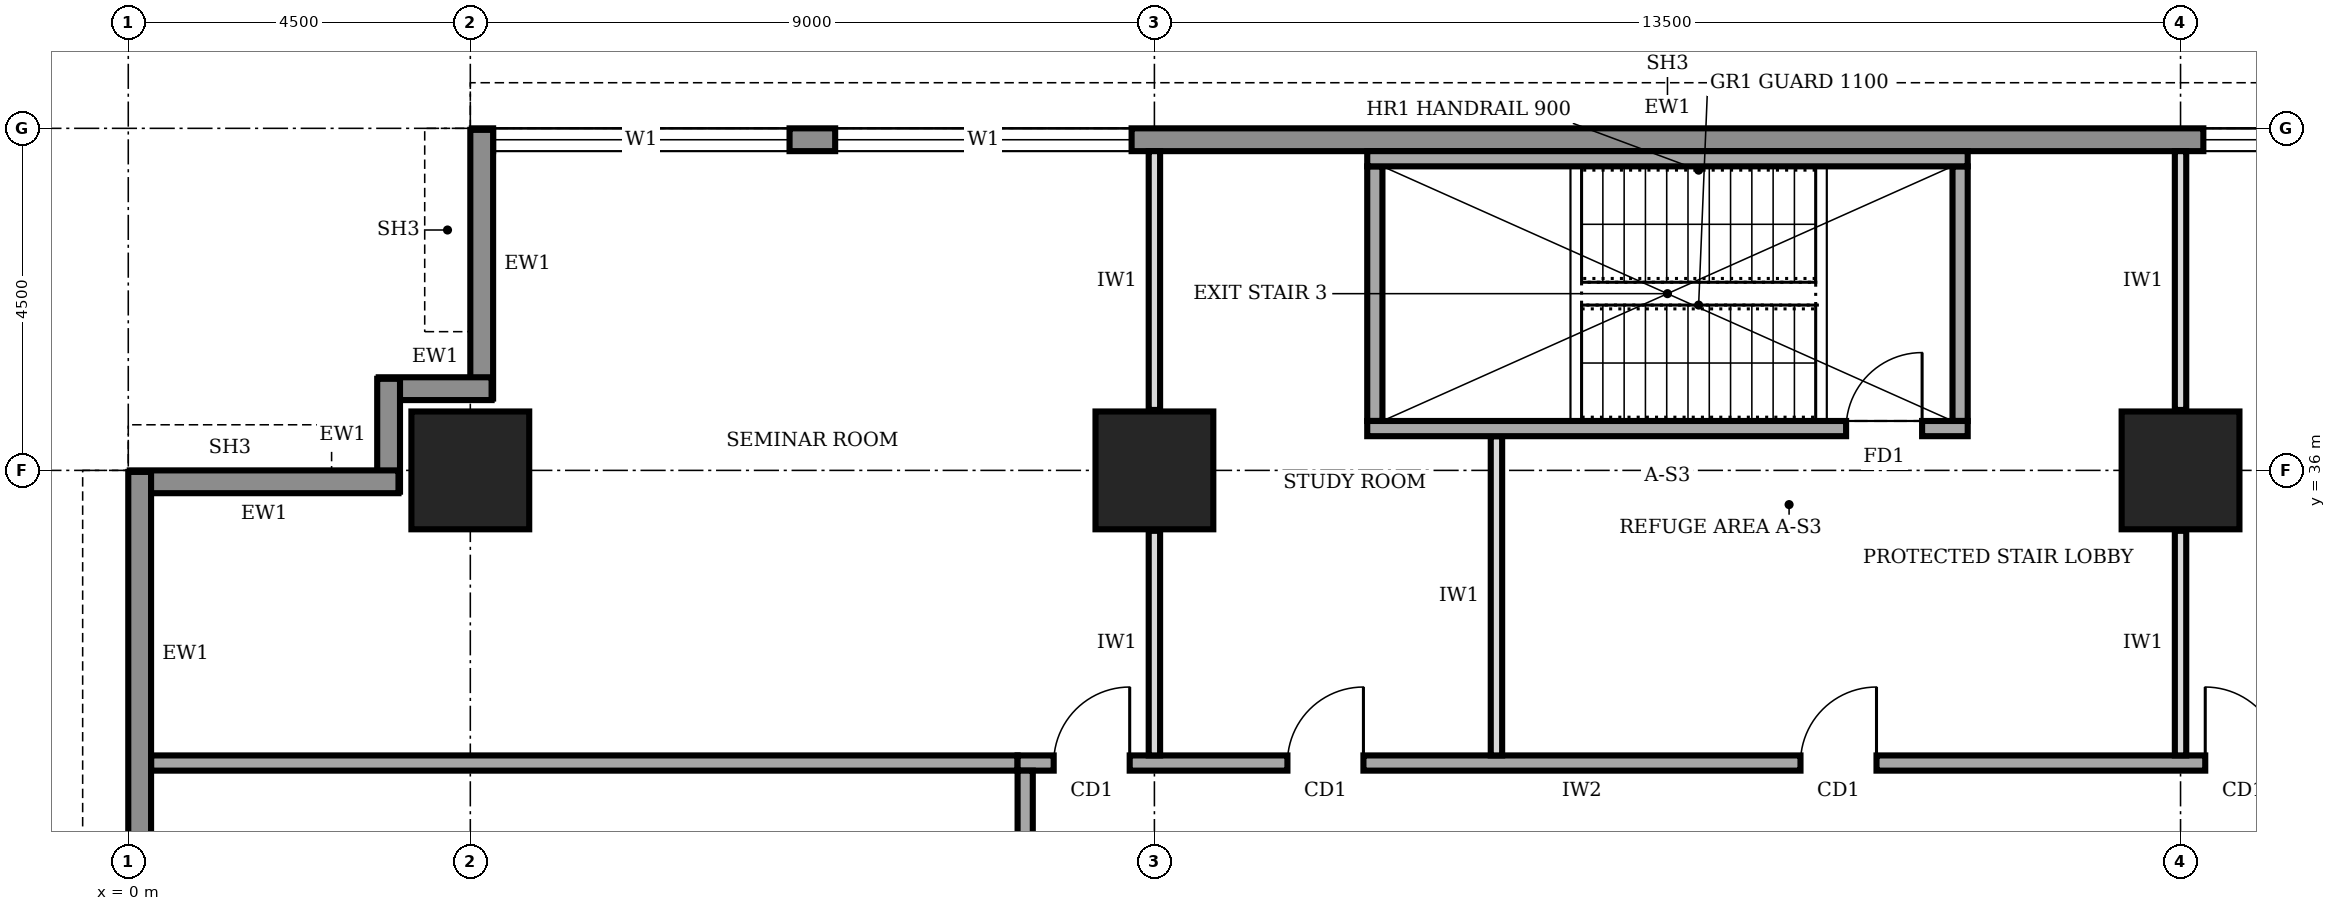
"""IFC4 building model, lengths in metres.
Left out: names, types, materials, properties, quantities, classifications, styles, units other than length and angle.
Written with IfcOpenShell. Run it as: python <this file> out.ifc"""

import sys

from ifc_helpers import new_model, si_unit, direction, frame, frame_2d, origin, origin_2d, place, context, subcontext, project, spatial, rectangle, extrude, element, fill, save


model = new_model("IFC4")
c1 = context("Model", 3, precision=1e-05, world=origin(), true_north=direction((0.0, 1.0)))
c2 = subcontext(c1, "Body", "Model", "MODEL_VIEW")
j1 = project(units=[si_unit("LENGTHUNIT", "METRE"), si_unit("PLANEANGLEUNIT", "RADIAN")], contexts=[c1])
p1 = place(None, origin())
s1 = spatial("IfcSite", under=j1, at=p1, CompositionType="ELEMENT")
p2 = place(p1, origin())
s2 = spatial("IfcBuilding", under=s1, at=p2, CompositionType="ELEMENT")
p3 = place(p2, frame((0.0, 0.0, 221.0)))
s3 = spatial("IfcBuildingStorey", under=s2, at=p3, CompositionType="ELEMENT", Elevation=221.0)
for number, where, z_axis, x_axis in (
    (1, (4.5, 36.0, 0.0), (0.0, 0.0, 1.0), (1.0, 0.0, 0.0)),
    (2, (13.5, 36.0, 0.0), (0.0, 0.0, 1.0), (1.0, 0.0, 0.0)),
    (3, (27.0, 36.0, 0.0), (0.0, 0.0, 1.0), (1.0, 0.0, 0.0)),
):
    element("IfcColumn", number, at=place(p3, frame(where, z_axis=z_axis, x_axis=x_axis)), inside=s3, PredefinedType="COLUMN", context=c2, shape_type="SweptSolid", body=[
        extrude(rectangle(XDim=1.55, YDim=1.55, at=origin_2d()), origin(), (0.0, 0.0, 1.0), 4.0),
    ])
p4 = place(p3, frame((35.98, 40.35, 0.0), z_axis=(0.0, 0.0, 1.0), x_axis=(-1.0, 0.0, 0.0)))
e4 = element("IfcWall", 4, at=p4, inside=s3, PredefinedType="STANDARD", context=c2, shape_type="SweptSolid", body=[
    extrude(rectangle(XDim=31.46, YDim=0.3, at=frame_2d((15.73, 0.0))), origin(), (0.0, 0.0, 1.0), 3.75),
])
p5 = place(p4, frame((27.28, 0.0, 0.9)))
e5 = element("IfcOpeningElement", 5, at=p5, cuts=e4, PredefinedType="OPENING", context=c2, shape_type="SweptSolid", body=[
    extrude(rectangle(XDim=3.9, YDim=2.2, at=frame_2d((1.95, 1.1))), frame((0.0, 0.16, 0.0), z_axis=(0.0, -1.0, 0.0), x_axis=(1.0, 0.0, 0.0)), (0.0, 0.0, 1.0), 0.32),
])
p6 = place(p4, frame((22.78, 0.0, 0.9)))
e6 = element("IfcOpeningElement", 6, at=p6, cuts=e4, PredefinedType="OPENING", context=c2, shape_type="SweptSolid", body=[
    extrude(rectangle(XDim=3.9, YDim=2.2, at=frame_2d((1.95, 1.1))), frame((0.0, 0.16, 0.0), z_axis=(0.0, -1.0, 0.0), x_axis=(1.0, 0.0, 0.0)), (0.0, 0.0, 1.0), 0.32),
])
p7 = place(p4, frame((4.78, 0.0, 0.9)))
e7 = element("IfcOpeningElement", 7, at=p7, cuts=e4, PredefinedType="OPENING", context=c2, shape_type="SweptSolid", body=[
    extrude(rectangle(XDim=3.9, YDim=2.2, at=frame_2d((1.95, 1.1))), frame((0.0, 0.16, 0.0), z_axis=(0.0, -1.0, 0.0), x_axis=(1.0, 0.0, 0.0)), (0.0, 0.0, 1.0), 0.32),
])
p8 = place(p3, frame((4.65, 40.48, 0.0), z_axis=(0.0, 0.0, 1.0), x_axis=(0.0, -1.0, 0.0)))
e8 = element("IfcWall", 8, at=p8, inside=s3, PredefinedType="STANDARD", context=c2, shape_type="SweptSolid", body=[
    extrude(rectangle(XDim=3.535, YDim=0.3, at=frame_2d((1.768, 0.0))), origin(), (0.0, 0.0, 1.0), 2.85),
])
for number, where, z_axis, x_axis in (
    (9, (4.78, 37.075, 0.0), (0.0, 0.0, 1.0), (-1.0, 0.0, 0.0)),
    (10, (3.425, 37.205, 0.0), (0.0, 0.0, 1.0), (0.0, -1.0, 0.0)),
):
    element("IfcWall", number, at=place(p3, frame(where, z_axis=z_axis, x_axis=x_axis)), inside=s3, PredefinedType="STANDARD", context=c2, shape_type="SweptSolid", body=[
        extrude(rectangle(XDim=1.485, YDim=0.3, at=frame_2d((0.743, 0.0))), origin(), (0.0, 0.0, 1.0), 3.75),
    ])
p9 = place(p3, frame((3.555, 35.85, 0.0), z_axis=(0.0, 0.0, 1.0), x_axis=(-1.0, 0.0, 0.0)))
e11 = element("IfcWall", 11, at=p9, inside=s3, PredefinedType="STANDARD", context=c2, shape_type="SweptSolid", body=[
    extrude(rectangle(XDim=3.535, YDim=0.3, at=frame_2d((1.768, 0.0))), origin(), (0.0, 0.0, 1.0), 2.85),
])
p10 = place(p3, frame((0.15, 35.98, 0.0), z_axis=(0.0, 0.0, 1.0), x_axis=(0.0, -1.0, 0.0)))
e12 = element("IfcWall", 12, at=p10, inside=s3, PredefinedType="STANDARD", context=c2, shape_type="SweptSolid", body=[
    extrude(rectangle(XDim=31.46, YDim=0.3, at=frame_2d((15.73, 0.0))), origin(), (0.0, 0.0, 1.0), 3.75),
])
p11 = place(p10, frame((27.28, 0.0, 0.9)))
e13 = element("IfcOpeningElement", 13, at=p11, cuts=e12, PredefinedType="OPENING", context=c2, shape_type="SweptSolid", body=[
    extrude(rectangle(XDim=3.9, YDim=2.2, at=frame_2d((1.95, 1.1))), frame((0.0, 0.16, 0.0), z_axis=(0.0, -1.0, 0.0), x_axis=(1.0, 0.0, 0.0)), (0.0, 0.0, 1.0), 0.32),
])
p12 = place(p10, frame((22.78, 0.0, 0.9)))
e14 = element("IfcOpeningElement", 14, at=p12, cuts=e12, PredefinedType="OPENING", context=c2, shape_type="SweptSolid", body=[
    extrude(rectangle(XDim=3.9, YDim=2.2, at=frame_2d((1.95, 1.1))), frame((0.0, 0.16, 0.0), z_axis=(0.0, -1.0, 0.0), x_axis=(1.0, 0.0, 0.0)), (0.0, 0.0, 1.0), 0.32),
])
p13 = place(p10, frame((18.28, 0.0, 0.9)))
e15 = element("IfcOpeningElement", 15, at=p13, cuts=e12, PredefinedType="OPENING", context=c2, shape_type="SweptSolid", body=[
    extrude(rectangle(XDim=3.9, YDim=2.2, at=frame_2d((1.95, 1.1))), frame((0.0, 0.16, 0.0), z_axis=(0.0, -1.0, 0.0), x_axis=(1.0, 0.0, 0.0)), (0.0, 0.0, 1.0), 0.32),
])
p14 = place(p10, frame((13.78, 0.0, 0.9)))
e16 = element("IfcOpeningElement", 16, at=p14, cuts=e12, PredefinedType="OPENING", context=c2, shape_type="SweptSolid", body=[
    extrude(rectangle(XDim=3.9, YDim=2.2, at=frame_2d((1.95, 1.1))), frame((0.0, 0.16, 0.0), z_axis=(0.0, -1.0, 0.0), x_axis=(1.0, 0.0, 0.0)), (0.0, 0.0, 1.0), 0.32),
])
p15 = place(p10, frame((9.28, 0.0, 0.9)))
e17 = element("IfcOpeningElement", 17, at=p15, cuts=e12, PredefinedType="OPENING", context=c2, shape_type="SweptSolid", body=[
    extrude(rectangle(XDim=3.9, YDim=2.2, at=frame_2d((1.95, 1.1))), frame((0.0, 0.16, 0.0), z_axis=(0.0, -1.0, 0.0), x_axis=(1.0, 0.0, 0.0)), (0.0, 0.0, 1.0), 0.32),
])
p16 = place(p10, frame((4.78, 0.0, 0.9)))
e18 = element("IfcOpeningElement", 18, at=p16, cuts=e12, PredefinedType="OPENING", context=c2, shape_type="SweptSolid", body=[
    extrude(rectangle(XDim=3.9, YDim=2.2, at=frame_2d((1.95, 1.1))), frame((0.0, 0.16, 0.0), z_axis=(0.0, -1.0, 0.0), x_axis=(1.0, 0.0, 0.0)), (0.0, 0.0, 1.0), 0.32),
])
p17 = place(p3, frame((28.6, 32.15, 0.0), z_axis=(0.0, 0.0, 1.0), x_axis=(-1.0, 0.0, 0.0)))
e19 = element("IfcWall", 19, at=p17, inside=s3, PredefinedType="SOLIDWALL", context=c2, shape_type="SweptSolid", body=[
    extrude(rectangle(XDim=16.9, YDim=0.2, at=frame_2d((8.45, 0.0))), origin(), (0.0, 0.0, 1.0), 3.75),
])
p18 = place(p17, frame((15.425, 0.0, 0.0)))
e20 = element("IfcOpeningElement", 20, at=p18, cuts=e19, PredefinedType="OPENING", context=c2, shape_type="SweptSolid", body=[
    extrude(rectangle(XDim=1.0, YDim=2.1, at=frame_2d((0.5, 1.05))), frame((0.0, 0.11, 0.0), z_axis=(0.0, -1.0, 0.0), x_axis=(1.0, 0.0, 0.0)), (0.0, 0.0, 1.0), 0.22),
])
p19 = place(p17, frame((12.35, 0.0, 0.0)))
e21 = element("IfcOpeningElement", 21, at=p19, cuts=e19, PredefinedType="OPENING", context=c2, shape_type="SweptSolid", body=[
    extrude(rectangle(XDim=1.0, YDim=2.1, at=frame_2d((0.5, 1.05))), frame((0.0, 0.11, 0.0), z_axis=(0.0, -1.0, 0.0), x_axis=(1.0, 0.0, 0.0)), (0.0, 0.0, 1.0), 0.22),
])
p20 = place(p17, frame((5.6, 0.0, 0.0)))
e22 = element("IfcOpeningElement", 22, at=p20, cuts=e19, PredefinedType="OPENING", context=c2, shape_type="SweptSolid", body=[
    extrude(rectangle(XDim=1.0, YDim=2.1, at=frame_2d((0.5, 1.05))), frame((0.0, 0.11, 0.0), z_axis=(0.0, -1.0, 0.0), x_axis=(1.0, 0.0, 0.0)), (0.0, 0.0, 1.0), 0.22),
])
p21 = place(p17, frame((0.275, 0.0, 0.0)))
e23 = element("IfcOpeningElement", 23, at=p21, cuts=e19, PredefinedType="OPENING", context=c2, shape_type="SweptSolid", body=[
    extrude(rectangle(XDim=1.0, YDim=2.1, at=frame_2d((0.5, 1.05))), frame((0.0, 0.11, 0.0), z_axis=(0.0, -1.0, 0.0), x_axis=(1.0, 0.0, 0.0)), (0.0, 0.0, 1.0), 0.22),
])
p22 = place(p3, frame((11.8, 32.05, 0.0), z_axis=(0.0, 0.0, 1.0), x_axis=(0.0, -1.0, 0.0)))
e24 = element("IfcWall", 24, at=p22, inside=s3, PredefinedType="SOLIDWALL", context=c2, shape_type="SweptSolid", body=[
    extrude(rectangle(XDim=23.8, YDim=0.2, at=frame_2d((11.9, 0.0))), origin(), (0.0, 0.0, 1.0), 3.75),
])
p23 = place(p22, frame((20.675, 0.0, 0.0)))
e25 = element("IfcOpeningElement", 25, at=p23, cuts=e24, PredefinedType="OPENING", context=c2, shape_type="SweptSolid", body=[
    extrude(rectangle(XDim=1.0, YDim=2.1, at=frame_2d((0.5, 1.05))), frame((0.0, 0.11, 0.0), z_axis=(0.0, -1.0, 0.0), x_axis=(1.0, 0.0, 0.0)), (0.0, 0.0, 1.0), 0.22),
])
p24 = place(p22, frame((16.4, 0.0, 0.0)))
e26 = element("IfcOpeningElement", 26, at=p24, cuts=e24, PredefinedType="OPENING", context=c2, shape_type="SweptSolid", body=[
    extrude(rectangle(XDim=0.9, YDim=2.1, at=frame_2d((0.45, 1.05))), frame((0.0, 0.11, 0.0), z_axis=(0.0, -1.0, 0.0), x_axis=(1.0, 0.0, 0.0)), (0.0, 0.0, 1.0), 0.22),
])
p25 = place(p22, frame((11.6, 0.0, 0.0)))
e27 = element("IfcOpeningElement", 27, at=p25, cuts=e24, PredefinedType="OPENING", context=c2, shape_type="SweptSolid", body=[
    extrude(rectangle(XDim=0.9, YDim=2.1, at=frame_2d((0.45, 1.05))), frame((0.0, 0.11, 0.0), z_axis=(0.0, -1.0, 0.0), x_axis=(1.0, 0.0, 0.0)), (0.0, 0.0, 1.0), 0.22),
])
p26 = place(p22, frame((8.55, 0.0, 0.0)))
e28 = element("IfcOpeningElement", 28, at=p26, cuts=e24, PredefinedType="OPENING", context=c2, shape_type="SweptSolid", body=[
    extrude(rectangle(XDim=0.9, YDim=2.1, at=frame_2d((0.45, 1.05))), frame((0.0, 0.11, 0.0), z_axis=(0.0, -1.0, 0.0), x_axis=(1.0, 0.0, 0.0)), (0.0, 0.0, 1.0), 0.22),
])
p27 = place(p22, frame((5.55, 0.0, 0.0)))
e29 = element("IfcOpeningElement", 29, at=p27, cuts=e24, PredefinedType="OPENING", context=c2, shape_type="SweptSolid", body=[
    extrude(rectangle(XDim=1.0, YDim=2.1, at=frame_2d((0.5, 1.05))), frame((0.0, 0.11, 0.0), z_axis=(0.0, -1.0, 0.0), x_axis=(1.0, 0.0, 0.0)), (0.0, 0.0, 1.0), 0.22),
])
p28 = place(p22, frame((13.65, 0.0, 0.0)))
e30 = element("IfcOpeningElement", 30, at=p28, cuts=e24, PredefinedType="OPENING", context=c2, shape_type="SweptSolid", body=[
    extrude(rectangle(XDim=1.0, YDim=2.1, at=frame_2d((0.5, 1.05))), frame((0.0, 0.11, 0.0), z_axis=(0.0, -1.0, 0.0), x_axis=(1.0, 0.0, 0.0)), (0.0, 0.0, 1.0), 0.22),
])
p29 = place(p22, frame((1.925, 0.0, 0.0)))
e31 = element("IfcOpeningElement", 31, at=p29, cuts=e24, PredefinedType="OPENING", context=c2, shape_type="SweptSolid", body=[
    extrude(rectangle(XDim=1.0, YDim=2.1, at=frame_2d((0.5, 1.05))), frame((0.0, 0.11, 0.0), z_axis=(0.0, -1.0, 0.0), x_axis=(1.0, 0.0, 0.0)), (0.0, 0.0, 1.0), 0.22),
])
p30 = place(p3, frame((0.3, 32.15, 0.0), z_axis=(0.0, 0.0, 1.0), x_axis=(1.0, 0.0, 0.0)))
e32 = element("IfcWall", 32, at=p30, inside=s3, PredefinedType="SOLIDWALL", context=c2, shape_type="SweptSolid", body=[
    extrude(rectangle(XDim=11.4, YDim=0.2, at=frame_2d((5.7, 0.0))), origin(), (0.0, 0.0, 1.0), 3.75),
])
p31 = place(p3, frame((13.5, 32.25, 0.0), z_axis=(0.0, 0.0, 1.0), x_axis=(0.0, 1.0, 0.0)))
e33 = element("IfcWall", 33, at=p31, inside=s3, PredefinedType="PARTITIONING", context=c2, shape_type="SweptSolid", body=[
    extrude(rectangle(XDim=2.955, YDim=0.15, at=frame_2d((1.478, 0.0))), origin(), (0.0, 0.0, 1.0), 2.85),
])
p32 = place(p3, frame((13.5, 36.795, 0.0), z_axis=(0.0, 0.0, 1.0), x_axis=(0.0, 1.0, 0.0)))
e34 = element("IfcWall", 34, at=p32, inside=s3, PredefinedType="PARTITIONING", context=c2, shape_type="SweptSolid", body=[
    extrude(rectangle(XDim=3.405, YDim=0.15, at=frame_2d((1.703, 0.0))), origin(), (0.0, 0.0, 1.0), 2.85),
])
p33 = place(p3, frame((18.0, 32.25, 0.0), z_axis=(0.0, 0.0, 1.0), x_axis=(0.0, 1.0, 0.0)))
e35 = element("IfcWall", 35, at=p33, inside=s3, PredefinedType="PARTITIONING", context=c2, shape_type="SweptSolid", body=[
    extrude(rectangle(XDim=4.2, YDim=0.15, at=frame_2d((2.1, 0.0))), origin(), (0.0, 0.0, 1.0), 3.75),
])
p34 = place(p3, frame((27.0, 32.25, 0.0), z_axis=(0.0, 0.0, 1.0), x_axis=(0.0, 1.0, 0.0)))
e36 = element("IfcWall", 36, at=p34, inside=s3, PredefinedType="PARTITIONING", context=c2, shape_type="SweptSolid", body=[
    extrude(rectangle(XDim=2.955, YDim=0.15, at=frame_2d((1.478, 0.0))), origin(), (0.0, 0.0, 1.0), 2.85),
])
p35 = place(p3, frame((27.0, 36.795, 0.0), z_axis=(0.0, 0.0, 1.0), x_axis=(0.0, 1.0, 0.0)))
e37 = element("IfcWall", 37, at=p35, inside=s3, PredefinedType="PARTITIONING", context=c2, shape_type="SweptSolid", body=[
    extrude(rectangle(XDim=3.405, YDim=0.15, at=frame_2d((1.703, 0.0))), origin(), (0.0, 0.0, 1.0), 2.85),
])
p36 = place(p3, frame((16.3, 36.55, 0.0), z_axis=(0.0, 0.0, 1.0), x_axis=(1.0, 0.0, 0.0)))
e38 = element("IfcWall", 38, at=p36, inside=s3, PredefinedType="SOLIDWALL", context=c2, shape_type="SweptSolid", body=[
    extrude(rectangle(XDim=7.9, YDim=0.2, at=frame_2d((3.95, 0.0))), origin(), (0.0, 0.0, 1.0), 3.75),
])
p37 = place(p36, frame((6.3, 0.0, 0.0)))
e39 = element("IfcOpeningElement", 39, at=p37, cuts=e38, PredefinedType="OPENING", context=c2, shape_type="SweptSolid", body=[
    extrude(rectangle(XDim=1.0, YDim=2.1, at=frame_2d((0.5, 1.05))), frame((0.0, 0.11, 0.0), z_axis=(0.0, -1.0, 0.0), x_axis=(1.0, 0.0, 0.0)), (0.0, 0.0, 1.0), 0.22),
])
p38 = place(p3, frame((16.3, 40.1, 0.0), z_axis=(0.0, 0.0, 1.0), x_axis=(1.0, 0.0, 0.0)))
e40 = element("IfcWall", 40, at=p38, inside=s3, PredefinedType="SOLIDWALL", context=c2, shape_type="SweptSolid", body=[
    extrude(rectangle(XDim=7.9, YDim=0.2, at=frame_2d((3.95, 0.0))), origin(), (0.0, 0.0, 1.0), 3.75),
])
for number, where, z_axis, x_axis in (
    (41, (16.4, 36.65, 0.0), (0.0, 0.0, 1.0), (0.0, 1.0, 0.0)),
    (42, (24.1, 36.65, 0.0), (0.0, 0.0, 1.0), (0.0, 1.0, 0.0)),
):
    element("IfcWall", number, at=place(p3, frame(where, z_axis=z_axis, x_axis=x_axis)), inside=s3, PredefinedType="SOLIDWALL", context=c2, shape_type="SweptSolid", body=[
        extrude(rectangle(XDim=3.35, YDim=0.2, at=frame_2d((1.675, 0.0))), origin(), (0.0, 0.0, 1.0), 3.75),
    ])
p39 = place(p5, origin())
e43 = element("IfcWindow", 43, at=p39, inside=s3, PartitioningType="SINGLE_PANEL", PredefinedType="WINDOW", context=c2, shape_type="SweptSolid", body=[
    extrude(rectangle(XDim=3.9, YDim=2.2, at=frame_2d((1.95, 1.1))), frame((0.0, 0.03, 0.0), z_axis=(0.0, -1.0, 0.0), x_axis=(1.0, 0.0, 0.0)), (0.0, 0.0, 1.0), 0.06),
])
fill(e5, e43)
p40 = place(p6, origin())
e44 = element("IfcWindow", 44, at=p40, inside=s3, PartitioningType="SINGLE_PANEL", PredefinedType="WINDOW", context=c2, shape_type="SweptSolid", body=[
    extrude(rectangle(XDim=3.9, YDim=2.2, at=frame_2d((1.95, 1.1))), frame((0.0, 0.03, 0.0), z_axis=(0.0, -1.0, 0.0), x_axis=(1.0, 0.0, 0.0)), (0.0, 0.0, 1.0), 0.06),
])
fill(e6, e44)
p41 = place(p7, origin())
e45 = element("IfcWindow", 45, at=p41, inside=s3, PartitioningType="SINGLE_PANEL", PredefinedType="WINDOW", context=c2, shape_type="SweptSolid", body=[
    extrude(rectangle(XDim=3.9, YDim=2.2, at=frame_2d((1.95, 1.1))), frame((0.0, 0.03, 0.0), z_axis=(0.0, -1.0, 0.0), x_axis=(1.0, 0.0, 0.0)), (0.0, 0.0, 1.0), 0.06),
])
fill(e7, e45)
p42 = place(p18, frame((1.0, 0.0, 0.0), z_axis=(0.0, 0.0, 1.0), x_axis=(-1.0, 0.0, 0.0)))
e46 = element("IfcDoor", 46, at=p42, inside=s3, OperationType="SINGLE_SWING_RIGHT", PredefinedType="DOOR", context=c2, shape_type="SweptSolid", body=[
    extrude(rectangle(XDim=1.0, YDim=2.1, at=frame_2d((0.5, 1.05))), frame((0.0, 0.025, 0.0), z_axis=(0.0, -1.0, 0.0), x_axis=(1.0, 0.0, 0.0)), (0.0, 0.0, 1.0), 0.05),
])
fill(e20, e46)
p43 = place(p19, frame((1.0, 0.0, 0.0), z_axis=(0.0, 0.0, 1.0), x_axis=(-1.0, 0.0, 0.0)))
e47 = element("IfcDoor", 47, at=p43, inside=s3, OperationType="SINGLE_SWING_RIGHT", PredefinedType="DOOR", context=c2, shape_type="SweptSolid", body=[
    extrude(rectangle(XDim=1.0, YDim=2.1, at=frame_2d((0.5, 1.05))), frame((0.0, 0.025, 0.0), z_axis=(0.0, -1.0, 0.0), x_axis=(1.0, 0.0, 0.0)), (0.0, 0.0, 1.0), 0.05),
])
fill(e21, e47)
p44 = place(p20, frame((1.0, 0.0, 0.0), z_axis=(0.0, 0.0, 1.0), x_axis=(-1.0, 0.0, 0.0)))
e48 = element("IfcDoor", 48, at=p44, inside=s3, OperationType="SINGLE_SWING_RIGHT", PredefinedType="DOOR", context=c2, shape_type="SweptSolid", body=[
    extrude(rectangle(XDim=1.0, YDim=2.1, at=frame_2d((0.5, 1.05))), frame((0.0, 0.025, 0.0), z_axis=(0.0, -1.0, 0.0), x_axis=(1.0, 0.0, 0.0)), (0.0, 0.0, 1.0), 0.05),
])
fill(e22, e48)
p45 = place(p21, frame((1.0, 0.0, 0.0), z_axis=(0.0, 0.0, 1.0), x_axis=(-1.0, 0.0, 0.0)))
e49 = element("IfcDoor", 49, at=p45, inside=s3, OperationType="SINGLE_SWING_LEFT", PredefinedType="DOOR", context=c2, shape_type="SweptSolid", body=[
    extrude(rectangle(XDim=1.0, YDim=2.1, at=frame_2d((0.5, 1.05))), frame((0.0, 0.025, 0.0), z_axis=(0.0, -1.0, 0.0), x_axis=(1.0, 0.0, 0.0)), (0.0, 0.0, 1.0), 0.05),
])
fill(e23, e49)
p46 = place(p37, origin())
e50 = element("IfcDoor", 50, at=p46, inside=s3, OperationType="SINGLE_SWING_RIGHT", PredefinedType="DOOR", context=c2, shape_type="SweptSolid", body=[
    extrude(rectangle(XDim=1.0, YDim=2.1, at=frame_2d((0.5, 1.05))), frame((0.0, 0.025, 0.0), z_axis=(0.0, -1.0, 0.0), x_axis=(1.0, 0.0, 0.0)), (0.0, 0.0, 1.0), 0.05),
])
fill(e39, e50)
save(model, sys.argv[1])
